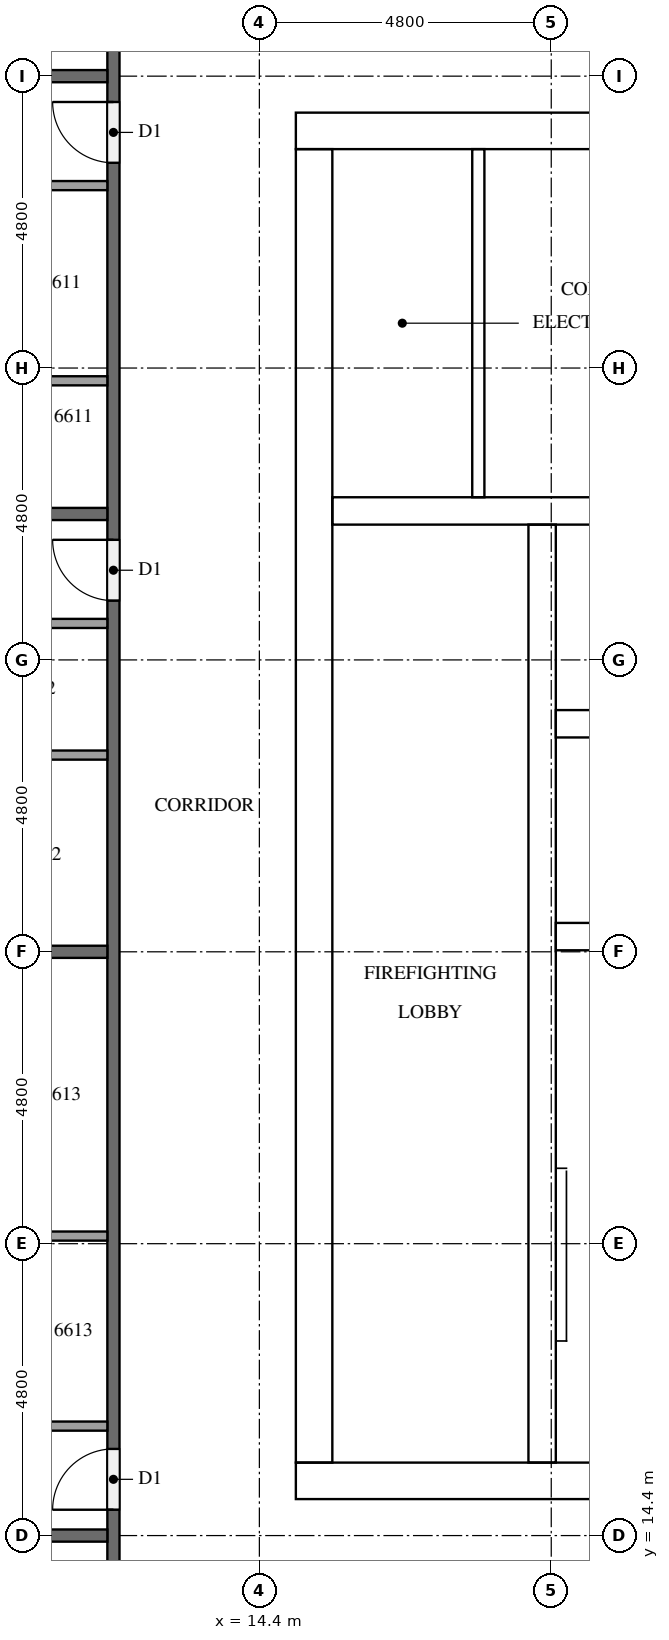
"""IFC4 building model, lengths in metres.
Left out: names, types, materials, properties, quantities, classifications, styles, units other than length and angle.
Written with IfcOpenShell. Run it as: python <this file> out.ifc"""

import sys

from ifc_helpers import new_model, si_unit, direction, frame, frame_2d, origin, place, context, subcontext, project, spatial, rectangle, extrude, element, fill, save


model = new_model("IFC4")
c1 = context("Model", 3, precision=1e-05, world=origin(), true_north=direction((0.0, 1.0)))
c2 = subcontext(c1, "Body", "Model", "MODEL_VIEW")
j1 = project(units=[si_unit("LENGTHUNIT", "METRE"), si_unit("PLANEANGLEUNIT", "RADIAN")], contexts=[c1])
p1 = place(None, origin())
s1 = spatial("IfcSite", under=j1, at=p1, CompositionType="ELEMENT")
p2 = place(p1, origin())
s2 = spatial("IfcBuilding", under=s1, at=p2, CompositionType="ELEMENT")
p3 = place(p2, frame((0.0, 0.0, 252.7)))
s3 = spatial("IfcBuildingStorey", under=s2, at=p3, CompositionType="ELEMENT", Elevation=252.7)
p4 = place(p3, frame((15.0, 15.3, 0.0), z_axis=(0.0, 0.0, 1.0), x_axis=(1.0, 0.0, 0.0)))
e1 = element("IfcWall", 1, at=p4, inside=s3, PredefinedType="SHEAR", context=c2, shape_type="SweptSolid", body=[
    extrude(rectangle(XDim=32.4, YDim=0.6, at=frame_2d((16.2, 0.0))), origin(), (0.0, 0.0, 1.0), 3.2),
])
p5 = place(p4, frame((15.3, 0.0, 0.0)))
e2 = element("IfcOpeningElement", 2, at=p5, cuts=e1, PredefinedType="OPENING", context=c2, shape_type="SweptSolid", body=[
    extrude(rectangle(XDim=1.8, YDim=2.1, at=frame_2d((0.9, 1.05))), frame((0.0, 0.31, 0.0), z_axis=(0.0, -1.0, 0.0), x_axis=(1.0, 0.0, 0.0)), (0.0, 0.0, 1.0), 0.62),
])
p6 = place(p3, frame((15.0, 37.5, 0.0), z_axis=(0.0, 0.0, 1.0), x_axis=(1.0, 0.0, 0.0)))
e3 = element("IfcWall", 3, at=p6, inside=s3, PredefinedType="SHEAR", context=c2, shape_type="SweptSolid", body=[
    extrude(rectangle(XDim=32.4, YDim=0.6, at=frame_2d((16.2, 0.0))), origin(), (0.0, 0.0, 1.0), 3.2),
])
p7 = place(p6, frame((15.3, 0.0, 0.0)))
e4 = element("IfcOpeningElement", 4, at=p7, cuts=e3, PredefinedType="OPENING", context=c2, shape_type="SweptSolid", body=[
    extrude(rectangle(XDim=1.8, YDim=2.1, at=frame_2d((0.9, 1.05))), frame((0.0, 0.31, 0.0), z_axis=(0.0, -1.0, 0.0), x_axis=(1.0, 0.0, 0.0)), (0.0, 0.0, 1.0), 0.62),
])
p8 = place(p6, frame((1.25, 0.0, 0.0)))
e5 = element("IfcOpeningElement", 5, at=p8, cuts=e3, PredefinedType="OPENING", context=c2, shape_type="SweptSolid", body=[
    extrude(rectangle(XDim=1.0, YDim=2.1, at=frame_2d((0.5, 1.05))), frame((0.0, 0.31, 0.0), z_axis=(0.0, -1.0, 0.0), x_axis=(1.0, 0.0, 0.0)), (0.0, 0.0, 1.0), 0.62),
])
p9 = place(p6, frame((4.988, 0.0, 0.0)))
e6 = element("IfcOpeningElement", 6, at=p9, cuts=e3, PredefinedType="OPENING", context=c2, shape_type="SweptSolid", body=[
    extrude(rectangle(XDim=1.0, YDim=2.1, at=frame_2d((0.5, 1.05))), frame((0.0, 0.31, 0.0), z_axis=(0.0, -1.0, 0.0), x_axis=(1.0, 0.0, 0.0)), (0.0, 0.0, 1.0), 0.62),
])
p10 = place(p3, frame((15.3, 15.6, 0.0), z_axis=(0.0, 0.0, 1.0), x_axis=(0.0, 1.0, 0.0)))
e7 = element("IfcWall", 7, at=p10, inside=s3, PredefinedType="SHEAR", context=c2, shape_type="SweptSolid", body=[
    extrude(rectangle(XDim=21.6, YDim=0.6, at=frame_2d((10.8, 0.0))), origin(), (0.0, 0.0, 1.0), 3.2),
])
p11 = place(p10, frame((5.16, 0.0, 0.0)))
e8 = element("IfcOpeningElement", 8, at=p11, cuts=e7, PredefinedType="OPENING", context=c2, shape_type="SweptSolid", body=[
    extrude(rectangle(XDim=1.2, YDim=2.1, at=frame_2d((0.6, 1.05))), frame((0.0, 0.31, 0.0), z_axis=(0.0, -1.0, 0.0), x_axis=(1.0, 0.0, 0.0)), (0.0, 0.0, 1.0), 0.62),
])
p12 = place(p3, frame((19.05, 15.6, 0.0), z_axis=(0.0, 0.0, 1.0), x_axis=(0.0, 1.0, 0.0)))
e9 = element("IfcWall", 9, at=p12, inside=s3, PredefinedType="SHEAR", context=c2, shape_type="SweptSolid", body=[
    extrude(rectangle(XDim=15.425, YDim=0.45, at=frame_2d((7.712, 0.0))), origin(), (0.0, 0.0, 1.0), 3.2),
])
p13 = place(p12, frame((9.85, 0.0, 0.0)))
e10 = element("IfcOpeningElement", 10, at=p13, cuts=e9, PredefinedType="OPENING", context=c2, shape_type="SweptSolid", body=[
    extrude(rectangle(XDim=1.1, YDim=2.1, at=frame_2d((0.55, 1.05))), frame((0.0, 0.235, 0.0), z_axis=(0.0, -1.0, 0.0), x_axis=(1.0, 0.0, 0.0)), (0.0, 0.0, 1.0), 0.47),
])
p14 = place(p12, frame((13.35, 0.0, 0.0)))
e11 = element("IfcOpeningElement", 11, at=p14, cuts=e9, PredefinedType="OPENING", context=c2, shape_type="SweptSolid", body=[
    extrude(rectangle(XDim=1.1, YDim=2.1, at=frame_2d((0.55, 1.05))), frame((0.0, 0.235, 0.0), z_axis=(0.0, -1.0, 0.0), x_axis=(1.0, 0.0, 0.0)), (0.0, 0.0, 1.0), 0.47),
])
p15 = place(p12, frame((0.6, 0.0, 0.0)))
e12 = element("IfcOpeningElement", 12, at=p15, cuts=e9, PredefinedType="OPENING", context=c2, shape_type="SweptSolid", body=[
    extrude(rectangle(XDim=1.2, YDim=2.1, at=frame_2d((0.6, 1.05))), frame((0.0, 0.235, 0.0), z_axis=(0.0, -1.0, 0.0), x_axis=(1.0, 0.0, 0.0)), (0.0, 0.0, 1.0), 0.47),
])
for number, where, z_axis, x_axis in (
    (13, (19.275, 24.25, 0.0), (0.0, 0.0, 1.0), (1.0, 0.0, 0.0)),
    (14, (19.275, 27.75, 0.0), (0.0, 0.0, 1.0), (1.0, 0.0, 0.0)),
):
    element("IfcWall", number, at=place(p3, frame(where, z_axis=z_axis, x_axis=x_axis)), inside=s3, PredefinedType="SHEAR", context=c2, shape_type="SweptSolid", body=[
        extrude(rectangle(XDim=3.6, YDim=0.45, at=frame_2d((1.8, 0.0))), origin(), (0.0, 0.0, 1.0), 3.2),
    ])
p16 = place(p3, frame((15.6, 31.25, 0.0), z_axis=(0.0, 0.0, 1.0), x_axis=(1.0, 0.0, 0.0)))
e15 = element("IfcWall", 15, at=p16, inside=s3, PredefinedType="SHEAR", context=c2, shape_type="SweptSolid", body=[
    extrude(rectangle(XDim=7.275, YDim=0.45, at=frame_2d((3.637, 0.0))), origin(), (0.0, 0.0, 1.0), 3.2),
])
p17 = place(p3, frame((18.001, 31.475, 0.0), z_axis=(0.0, 0.0, 1.0), x_axis=(0.0, 1.0, 0.0)))
e16 = element("IfcWall", 16, at=p17, inside=s3, PredefinedType="PARTITIONING", context=c2, shape_type="SweptSolid", body=[
    extrude(rectangle(XDim=5.725, YDim=0.2, at=frame_2d((2.862, 0.0))), origin(), (0.0, 0.0, 1.0), 3.2),
])
p18 = place(p3, frame((12.0, 12.1, 0.0), z_axis=(0.0, 0.0, 1.0), x_axis=(0.0, 1.0, 0.0)))
e17 = element("IfcWall", 17, at=p18, inside=s3, PredefinedType="PARTITIONING", context=c2, shape_type="SweptSolid", body=[
    extrude(rectangle(XDim=28.6, YDim=0.2, at=frame_2d((14.3, 0.0))), origin(), (0.0, 0.0, 1.0), 3.2),
])
p19 = place(p18, frame((26.725, 0.0, 0.0)))
e18 = element("IfcOpeningElement", 18, at=p19, cuts=e17, PredefinedType="OPENING", context=c2, shape_type="SweptSolid", body=[
    extrude(rectangle(XDim=1.0, YDim=2.1, at=frame_2d((0.5, 1.05))), frame((0.0, 0.11, 0.0), z_axis=(0.0, -1.0, 0.0), x_axis=(1.0, 0.0, 0.0)), (0.0, 0.0, 1.0), 0.22),
])
p20 = place(p18, frame((24.875, 0.0, 0.0)))
e19 = element("IfcOpeningElement", 19, at=p20, cuts=e17, PredefinedType="OPENING", context=c2, shape_type="SweptSolid", body=[
    extrude(rectangle(XDim=1.0, YDim=2.1, at=frame_2d((0.5, 1.05))), frame((0.0, 0.11, 0.0), z_axis=(0.0, -1.0, 0.0), x_axis=(1.0, 0.0, 0.0)), (0.0, 0.0, 1.0), 0.22),
])
p21 = place(p18, frame((17.675, 0.0, 0.0)))
e20 = element("IfcOpeningElement", 20, at=p21, cuts=e17, PredefinedType="OPENING", context=c2, shape_type="SweptSolid", body=[
    extrude(rectangle(XDim=1.0, YDim=2.1, at=frame_2d((0.5, 1.05))), frame((0.0, 0.11, 0.0), z_axis=(0.0, -1.0, 0.0), x_axis=(1.0, 0.0, 0.0)), (0.0, 0.0, 1.0), 0.22),
])
p22 = place(p18, frame((2.725, 0.0, 0.0)))
e21 = element("IfcOpeningElement", 21, at=p22, cuts=e17, PredefinedType="OPENING", context=c2, shape_type="SweptSolid", body=[
    extrude(rectangle(XDim=1.0, YDim=2.1, at=frame_2d((0.5, 1.05))), frame((0.0, 0.11, 0.0), z_axis=(0.0, -1.0, 0.0), x_axis=(1.0, 0.0, 0.0)), (0.0, 0.0, 1.0), 0.22),
])
p23 = place(p18, frame((0.875, 0.0, 0.0)))
e22 = element("IfcOpeningElement", 22, at=p23, cuts=e17, PredefinedType="OPENING", context=c2, shape_type="SweptSolid", body=[
    extrude(rectangle(XDim=1.0, YDim=2.1, at=frame_2d((0.5, 1.05))), frame((0.0, 0.11, 0.0), z_axis=(0.0, -1.0, 0.0), x_axis=(1.0, 0.0, 0.0)), (0.0, 0.0, 1.0), 0.22),
])
p24 = place(p3, frame((0.275, 38.4, 0.0), z_axis=(0.0, 0.0, 1.0), x_axis=(1.0, 0.0, 0.0)))
e23 = element("IfcWall", 23, at=p24, inside=s3, PredefinedType="PARTITIONING", context=c2, shape_type="SweptSolid", body=[
    extrude(rectangle(XDim=11.625, YDim=0.2, at=frame_2d((5.812, 0.0))), origin(), (0.0, 0.0, 1.0), 3.2),
])
for number, where, z_axis, x_axis in (
    (24, (0.1, 31.2, 0.0), (0.0, 0.0, 1.0), (1.0, 0.0, 0.0)),
    (25, (0.1, 24.0, 0.0), (0.0, 0.0, 1.0), (1.0, 0.0, 0.0)),
    (26, (0.1, 14.4, 0.0), (0.0, 0.0, 1.0), (1.0, 0.0, 0.0)),
):
    element("IfcWall", number, at=place(p3, frame(where, z_axis=z_axis, x_axis=x_axis)), inside=s3, PredefinedType="PARTITIONING", context=c2, shape_type="SweptSolid", body=[
        extrude(rectangle(XDim=11.8, YDim=0.2, at=frame_2d((5.9, 0.0))), origin(), (0.0, 0.0, 1.0), 3.2),
    ])
p25 = place(p3, frame((11.9, 33.39, 0.0), z_axis=(0.0, 0.0, 1.0), x_axis=(-1.0, 0.0, 0.0)))
e27 = element("IfcWall", 27, at=p25, inside=s3, PredefinedType="PARTITIONING", context=c2, shape_type="SweptSolid", body=[
    extrude(rectangle(XDim=2.975, YDim=0.15, at=frame_2d((1.487, 0.0))), origin(), (0.0, 0.0, 1.0), 3.2),
])
p26 = place(p3, frame((11.9, 36.6, 0.0), z_axis=(0.0, 0.0, 1.0), x_axis=(-1.0, 0.0, 0.0)))
e28 = element("IfcWall", 28, at=p26, inside=s3, PredefinedType="PARTITIONING", context=c2, shape_type="SweptSolid", body=[
    extrude(rectangle(XDim=3.125, YDim=0.15, at=frame_2d((1.562, 0.0))), origin(), (0.0, 0.0, 1.0), 3.2),
])
p27 = place(p3, frame((11.9, 27.235, 0.0), z_axis=(0.0, 0.0, 1.0), x_axis=(-1.0, 0.0, 0.0)))
e29 = element("IfcWall", 29, at=p27, inside=s3, PredefinedType="PARTITIONING", context=c2, shape_type="SweptSolid", body=[
    extrude(rectangle(XDim=4.175, YDim=0.15, at=frame_2d((2.087, 0.0))), origin(), (0.0, 0.0, 1.0), 3.2),
])
p28 = place(p3, frame((11.9, 29.4, 0.0), z_axis=(0.0, 0.0, 1.0), x_axis=(-1.0, 0.0, 0.0)))
e30 = element("IfcWall", 30, at=p28, inside=s3, PredefinedType="PARTITIONING", context=c2, shape_type="SweptSolid", body=[
    extrude(rectangle(XDim=4.325, YDim=0.15, at=frame_2d((2.163, 0.0))), origin(), (0.0, 0.0, 1.0), 3.2),
])
p29 = place(p3, frame((11.9, 19.325, 0.0), z_axis=(0.0, 0.0, 1.0), x_axis=(-1.0, 0.0, 0.0)))
e31 = element("IfcWall", 31, at=p29, inside=s3, PredefinedType="PARTITIONING", context=c2, shape_type="SweptSolid", body=[
    extrude(rectangle(XDim=2.975, YDim=0.15, at=frame_2d((1.487, 0.0))), origin(), (0.0, 0.0, 1.0), 3.2),
])
p30 = place(p3, frame((11.9, 16.2, 0.0), z_axis=(0.0, 0.0, 1.0), x_axis=(-1.0, 0.0, 0.0)))
e32 = element("IfcWall", 32, at=p30, inside=s3, PredefinedType="PARTITIONING", context=c2, shape_type="SweptSolid", body=[
    extrude(rectangle(XDim=3.125, YDim=0.15, at=frame_2d((1.562, 0.0))), origin(), (0.0, 0.0, 1.0), 3.2),
])
p31 = place(p13, origin())
e33 = element("IfcDoor", 33, at=p31, inside=s3, OperationType="DOUBLE_DOOR_SLIDING", PredefinedType="DOOR", context=c2, shape_type="SweptSolid", body=[
    extrude(rectangle(XDim=1.1, YDim=2.1, at=frame_2d((0.55, 1.05))), frame((0.0, 0.025, 0.0), z_axis=(0.0, -1.0, 0.0), x_axis=(1.0, 0.0, 0.0)), (0.0, 0.0, 1.0), 0.05),
])
fill(e10, e33)
p32 = place(p14, origin())
e34 = element("IfcDoor", 34, at=p32, inside=s3, OperationType="DOUBLE_DOOR_SLIDING", PredefinedType="DOOR", context=c2, shape_type="SweptSolid", body=[
    extrude(rectangle(XDim=1.1, YDim=2.1, at=frame_2d((0.55, 1.05))), frame((0.0, 0.025, 0.0), z_axis=(0.0, -1.0, 0.0), x_axis=(1.0, 0.0, 0.0)), (0.0, 0.0, 1.0), 0.05),
])
fill(e11, e34)
p33 = place(p15, frame((1.2, 0.0, 0.0), z_axis=(0.0, 0.0, 1.0), x_axis=(-1.0, 0.0, 0.0)))
e35 = element("IfcDoor", 35, at=p33, inside=s3, OperationType="SINGLE_SWING_RIGHT", PredefinedType="DOOR", context=c2, shape_type="SweptSolid", body=[
    extrude(rectangle(XDim=1.2, YDim=2.1, at=frame_2d((0.6, 1.05))), frame((0.0, 0.025, 0.0), z_axis=(0.0, -1.0, 0.0), x_axis=(1.0, 0.0, 0.0)), (0.0, 0.0, 1.0), 0.05),
])
fill(e12, e35)
p34 = place(p11, frame((1.2, 0.0, 0.0), z_axis=(0.0, 0.0, 1.0), x_axis=(-1.0, 0.0, 0.0)))
e36 = element("IfcDoor", 36, at=p34, inside=s3, OperationType="SINGLE_SWING_LEFT", PredefinedType="DOOR", context=c2, shape_type="SweptSolid", body=[
    extrude(rectangle(XDim=1.2, YDim=2.1, at=frame_2d((0.6, 1.05))), frame((0.0, 0.025, 0.0), z_axis=(0.0, -1.0, 0.0), x_axis=(1.0, 0.0, 0.0)), (0.0, 0.0, 1.0), 0.05),
])
fill(e8, e36)
p35 = place(p8, origin())
e37 = element("IfcDoor", 37, at=p35, inside=s3, OperationType="SINGLE_SWING_LEFT", PredefinedType="DOOR", context=c2, shape_type="SweptSolid", body=[
    extrude(rectangle(XDim=1.0, YDim=2.1, at=frame_2d((0.5, 1.05))), frame((0.0, 0.025, 0.0), z_axis=(0.0, -1.0, 0.0), x_axis=(1.0, 0.0, 0.0)), (0.0, 0.0, 1.0), 0.05),
])
fill(e5, e37)
p36 = place(p20, origin())
e38 = element("IfcDoor", 38, at=p36, inside=s3, OperationType="SINGLE_SWING_RIGHT", PredefinedType="DOOR", context=c2, shape_type="SweptSolid", body=[
    extrude(rectangle(XDim=1.0, YDim=2.1, at=frame_2d((0.5, 1.05))), frame((0.0, 0.025, 0.0), z_axis=(0.0, -1.0, 0.0), x_axis=(1.0, 0.0, 0.0)), (0.0, 0.0, 1.0), 0.05),
])
fill(e19, e38)
p37 = place(p21, origin())
e39 = element("IfcDoor", 39, at=p37, inside=s3, OperationType="SINGLE_SWING_RIGHT", PredefinedType="DOOR", context=c2, shape_type="SweptSolid", body=[
    extrude(rectangle(XDim=1.0, YDim=2.1, at=frame_2d((0.5, 1.05))), frame((0.0, 0.025, 0.0), z_axis=(0.0, -1.0, 0.0), x_axis=(1.0, 0.0, 0.0)), (0.0, 0.0, 1.0), 0.05),
])
fill(e20, e39)
p38 = place(p22, origin())
e40 = element("IfcDoor", 40, at=p38, inside=s3, OperationType="SINGLE_SWING_LEFT", PredefinedType="DOOR", context=c2, shape_type="SweptSolid", body=[
    extrude(rectangle(XDim=1.0, YDim=2.1, at=frame_2d((0.5, 1.05))), frame((0.0, 0.025, 0.0), z_axis=(0.0, -1.0, 0.0), x_axis=(1.0, 0.0, 0.0)), (0.0, 0.0, 1.0), 0.05),
])
fill(e21, e40)
save(model, sys.argv[1])
